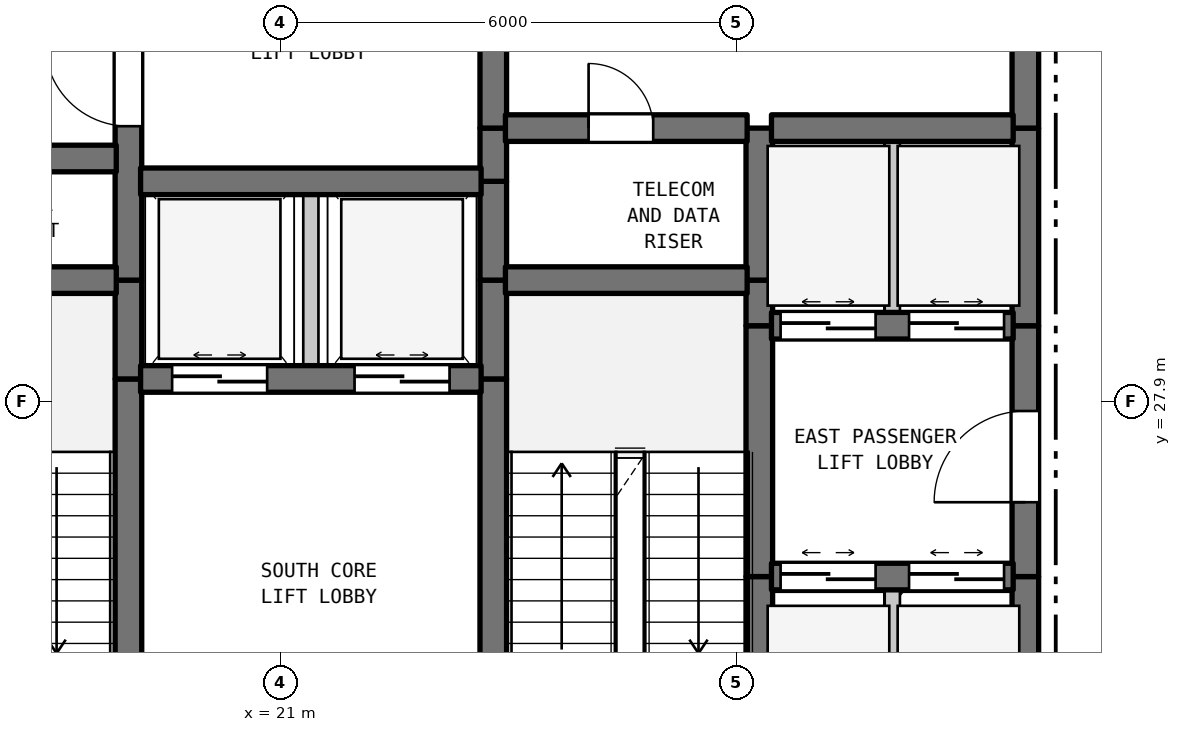
"""IFC4 building model, lengths in metres.
Left out: names, types, materials, properties, quantities, classifications, styles, units other than length and angle.
Written with IfcOpenShell. Run it as: python <this file> out.ifc"""

import sys

from ifc_helpers import new_model, si_unit, direction, frame, frame_2d, origin, place, context, subcontext, project, spatial, rectangle, extrude, element, fill, save


model = new_model("IFC4")
c1 = context("Model", 3, precision=1e-05, world=origin(), true_north=direction((0.0, 1.0)))
c2 = subcontext(c1, "Body", "Model", "MODEL_VIEW")
j1 = project(units=[si_unit("LENGTHUNIT", "METRE"), si_unit("PLANEANGLEUNIT", "RADIAN")], contexts=[c1])
p1 = place(None, origin())
s1 = spatial("IfcSite", under=j1, at=p1, CompositionType="ELEMENT")
p2 = place(p1, origin())
s2 = spatial("IfcBuilding", under=s1, at=p2, CompositionType="ELEMENT")
p3 = place(p2, frame((0.0, 0.0, 214.3)))
s3 = spatial("IfcBuildingStorey", under=s2, at=p3, CompositionType="ELEMENT", Elevation=214.3)
p4 = place(p3, frame((19.0, 22.7, 0.0), z_axis=(0.0, 0.0, 1.0), x_axis=(0.0, 1.0, 0.0)))
e1 = element("IfcWall", 1, at=p4, inside=s3, PredefinedType="SHEAR", context=c2, shape_type="SweptSolid", body=[
    extrude(rectangle(XDim=5.5, YDim=0.35, at=frame_2d((2.75, 0.0))), origin(), (0.0, 0.0, 1.0), 3.38),
])
p5 = place(p4, frame((0.631, 0.0, 0.0)))
e2 = element("IfcOpeningElement", 2, at=p5, cuts=e1, PredefinedType="OPENING", context=c2, shape_type="SweptSolid", body=[
    extrude(rectangle(XDim=1.1, YDim=2.15, at=frame_2d((0.55, 1.075))), frame((0.0, 0.185, 0.0), z_axis=(0.0, -1.0, 0.0), x_axis=(1.0, 0.0, 0.0)), (0.0, 0.0, 1.0), 0.37),
])
p6 = place(p3, frame((19.0, 28.2, 0.0), z_axis=(0.0, 0.0, 1.0), x_axis=(0.0, 1.0, 0.0)))
e3 = element("IfcWall", 3, at=p6, inside=s3, PredefinedType="SHEAR", context=c2, shape_type="SweptSolid", body=[
    extrude(rectangle(XDim=1.3, YDim=0.35, at=frame_2d((0.65, 0.0))), origin(), (0.0, 0.0, 1.0), 3.38),
])
p7 = place(p3, frame((19.0, 29.5, 0.0), z_axis=(0.0, 0.0, 1.0), x_axis=(0.0, 1.0, 0.0)))
e4 = element("IfcWall", 4, at=p7, inside=s3, PredefinedType="SHEAR", context=c2, shape_type="SweptSolid", body=[
    extrude(rectangle(XDim=5.5, YDim=0.35, at=frame_2d((2.75, 0.0))), origin(), (0.0, 0.0, 1.0), 3.38),
])
p8 = place(p7, frame((2.025, 0.0, 0.0)))
e5 = element("IfcOpeningElement", 5, at=p8, cuts=e4, PredefinedType="OPENING", context=c2, shape_type="SweptSolid", body=[
    extrude(rectangle(XDim=1.1, YDim=2.15, at=frame_2d((0.55, 1.075))), frame((0.0, 0.185, 0.0), z_axis=(0.0, -1.0, 0.0), x_axis=(1.0, 0.0, 0.0)), (0.0, 0.0, 1.0), 0.37),
])
p9 = place(p3, frame((21.4, 28.2, 0.0), z_axis=(0.0, 0.0, 1.0), x_axis=(0.0, 1.0, 0.0)))
e6 = element("IfcWall", 6, at=p9, inside=s3, PredefinedType="STANDARD", context=c2, shape_type="SweptSolid", body=[
    extrude(rectangle(XDim=2.6, YDim=0.2, at=frame_2d((1.3, 0.0))), origin(), (0.0, 0.0, 1.0), 3.38),
])
p10 = place(p3, frame((23.8, 22.7, 0.0), z_axis=(0.0, 0.0, 1.0), x_axis=(0.0, 1.0, 0.0)))
e7 = element("IfcWall", 7, at=p10, inside=s3, PredefinedType="SHEAR", context=c2, shape_type="SweptSolid", body=[
    extrude(rectangle(XDim=5.5, YDim=0.35, at=frame_2d((2.75, 0.0))), origin(), (0.0, 0.0, 1.0), 3.38),
])
p11 = place(p10, frame((0.235, 0.0, 0.0)))
e8 = element("IfcOpeningElement", 8, at=p11, cuts=e7, PredefinedType="OPENING", context=c2, shape_type="SweptSolid", body=[
    extrude(rectangle(XDim=1.1, YDim=2.15, at=frame_2d((0.55, 1.075))), frame((0.0, 0.185, 0.0), z_axis=(0.0, -1.0, 0.0), x_axis=(1.0, 0.0, 0.0)), (0.0, 0.0, 1.0), 0.37),
])
for number, where, z_axis, x_axis in (
    (9, (23.8, 28.2, 0.0), (0.0, 0.0, 1.0), (0.0, 1.0, 0.0)),
    (10, (23.8, 29.5, 0.0), (0.0, 0.0, 1.0), (0.0, 1.0, 0.0)),
):
    element("IfcWall", number, at=place(p3, frame(where, z_axis=z_axis, x_axis=x_axis)), inside=s3, PredefinedType="SHEAR", context=c2, shape_type="SweptSolid", body=[
        extrude(rectangle(XDim=1.3, YDim=0.35, at=frame_2d((0.65, 0.0))), origin(), (0.0, 0.0, 1.0), 3.38),
    ])
p12 = place(p3, frame((23.8, 30.8, 0.0), z_axis=(0.0, 0.0, 1.0), x_axis=(0.0, 1.0, 0.0)))
e11 = element("IfcWall", 11, at=p12, inside=s3, PredefinedType="SHEAR", context=c2, shape_type="SweptSolid", body=[
    extrude(rectangle(XDim=0.7, YDim=0.35, at=frame_2d((0.35, 0.0))), origin(), (0.0, 0.0, 1.0), 3.38),
])
p13 = place(p3, frame((23.8, 31.5, 0.0), z_axis=(0.0, 0.0, 1.0), x_axis=(0.0, 1.0, 0.0)))
e12 = element("IfcWall", 12, at=p13, inside=s3, PredefinedType="SHEAR", context=c2, shape_type="SweptSolid", body=[
    extrude(rectangle(XDim=3.5, YDim=0.35, at=frame_2d((1.75, 0.0))), origin(), (0.0, 0.0, 1.0), 3.38),
])
p14 = place(p13, frame((1.127, 0.0, 0.0)))
e13 = element("IfcOpeningElement", 13, at=p14, cuts=e12, PredefinedType="OPENING", context=c2, shape_type="SweptSolid", body=[
    extrude(rectangle(XDim=1.1, YDim=2.15, at=frame_2d((0.55, 1.075))), frame((0.0, 0.185, 0.0), z_axis=(0.0, -1.0, 0.0), x_axis=(1.0, 0.0, 0.0)), (0.0, 0.0, 1.0), 0.37),
])
p15 = place(p3, frame((27.3, 22.7, 0.0), z_axis=(0.0, 0.0, 1.0), x_axis=(0.0, 1.0, 0.0)))
e14 = element("IfcWall", 14, at=p15, inside=s3, PredefinedType="SHEAR", context=c2, shape_type="SweptSolid", body=[
    extrude(rectangle(XDim=2.9, YDim=0.35, at=frame_2d((1.45, 0.0))), origin(), (0.0, 0.0, 1.0), 3.38),
])
p16 = place(p3, frame((27.3, 25.6, 0.0), z_axis=(0.0, 0.0, 1.0), x_axis=(0.0, 1.0, 0.0)))
e15 = element("IfcWall", 15, at=p16, inside=s3, PredefinedType="SHEAR", context=c2, shape_type="SweptSolid", body=[
    extrude(rectangle(XDim=3.3, YDim=0.35, at=frame_2d((1.65, 0.0))), origin(), (0.0, 0.0, 1.0), 3.38),
])
p17 = place(p3, frame((27.3, 28.9, 0.0), z_axis=(0.0, 0.0, 1.0), x_axis=(0.0, 1.0, 0.0)))
e16 = element("IfcWall", 16, at=p17, inside=s3, PredefinedType="SHEAR", context=c2, shape_type="SweptSolid", body=[
    extrude(rectangle(XDim=0.6, YDim=0.35, at=frame_2d((0.3, 0.0))), origin(), (0.0, 0.0, 1.0), 3.38),
])
p18 = place(p3, frame((27.3, 29.5, 0.0), z_axis=(0.0, 0.0, 1.0), x_axis=(0.0, 1.0, 0.0)))
e17 = element("IfcWall", 17, at=p18, inside=s3, PredefinedType="SHEAR", context=c2, shape_type="SweptSolid", body=[
    extrude(rectangle(XDim=2.0, YDim=0.35, at=frame_2d((1.0, 0.0))), origin(), (0.0, 0.0, 1.0), 3.38),
])
p19 = place(p3, frame((29.05, 22.7, 0.0), z_axis=(0.0, 0.0, 1.0), x_axis=(0.0, 1.0, 0.0)))
e18 = element("IfcWall", 18, at=p19, inside=s3, PredefinedType="STANDARD", context=c2, shape_type="SweptSolid", body=[
    extrude(rectangle(XDim=2.9, YDim=0.2, at=frame_2d((1.45, 0.0))), origin(), (0.0, 0.0, 1.0), 3.38),
])
p20 = place(p3, frame((29.05, 28.9, 0.0), z_axis=(0.0, 0.0, 1.0), x_axis=(0.0, 1.0, 0.0)))
e19 = element("IfcWall", 19, at=p20, inside=s3, PredefinedType="STANDARD", context=c2, shape_type="SweptSolid", body=[
    extrude(rectangle(XDim=2.6, YDim=0.2, at=frame_2d((1.3, 0.0))), origin(), (0.0, 0.0, 1.0), 3.38),
])
p21 = place(p3, frame((30.8, 22.7, 0.0), z_axis=(0.0, 0.0, 1.0), x_axis=(0.0, 1.0, 0.0)))
e20 = element("IfcWall", 20, at=p21, inside=s3, PredefinedType="SHEAR", context=c2, shape_type="SweptSolid", body=[
    extrude(rectangle(XDim=2.9, YDim=0.35, at=frame_2d((1.45, 0.0))), origin(), (0.0, 0.0, 1.0), 3.38),
])
p22 = place(p3, frame((30.8, 25.6, 0.0), z_axis=(0.0, 0.0, 1.0), x_axis=(0.0, 1.0, 0.0)))
e21 = element("IfcWall", 21, at=p22, inside=s3, PredefinedType="SHEAR", context=c2, shape_type="SweptSolid", body=[
    extrude(rectangle(XDim=3.3, YDim=0.35, at=frame_2d((1.65, 0.0))), origin(), (0.0, 0.0, 1.0), 3.38),
])
p23 = place(p22, frame((0.978, 0.0, 0.0)))
e22 = element("IfcOpeningElement", 22, at=p23, cuts=e21, PredefinedType="OPENING", context=c2, shape_type="SweptSolid", body=[
    extrude(rectangle(XDim=1.2, YDim=2.2, at=frame_2d((0.6, 1.1))), frame((0.0, 0.185, 0.0), z_axis=(0.0, -1.0, 0.0), x_axis=(1.0, 0.0, 0.0)), (0.0, 0.0, 1.0), 0.37),
])
p24 = place(p3, frame((30.8, 28.9, 0.0), z_axis=(0.0, 0.0, 1.0), x_axis=(0.0, 1.0, 0.0)))
e23 = element("IfcWall", 23, at=p24, inside=s3, PredefinedType="SHEAR", context=c2, shape_type="SweptSolid", body=[
    extrude(rectangle(XDim=2.6, YDim=0.35, at=frame_2d((1.3, 0.0))), origin(), (0.0, 0.0, 1.0), 3.38),
])
p25 = place(p3, frame((30.8, 31.5, 0.0), z_axis=(0.0, 0.0, 1.0), x_axis=(0.0, 1.0, 0.0)))
e24 = element("IfcWall", 24, at=p25, inside=s3, PredefinedType="SHEAR", context=c2, shape_type="SweptSolid", body=[
    extrude(rectangle(XDim=3.5, YDim=0.35, at=frame_2d((1.75, 0.0))), origin(), (0.0, 0.0, 1.0), 3.38),
])
p26 = place(p25, frame((1.15, 0.0, 0.0)))
e25 = element("IfcOpeningElement", 25, at=p26, cuts=e24, PredefinedType="OPENING", context=c2, shape_type="SweptSolid", body=[
    extrude(rectangle(XDim=1.2, YDim=2.2, at=frame_2d((0.6, 1.1))), frame((0.0, 0.185, 0.0), z_axis=(0.0, -1.0, 0.0), x_axis=(1.0, 0.0, 0.0)), (0.0, 0.0, 1.0), 0.37),
])
p27 = place(p3, frame((27.46, 25.6, 0.0), z_axis=(0.0, 0.0, 1.0), x_axis=(1.0, 0.0, 0.0)))
e26 = element("IfcWall", 26, at=p27, inside=s3, PredefinedType="SHEAR", context=c2, shape_type="SweptSolid", body=[
    extrude(rectangle(XDim=3.18, YDim=0.35, at=frame_2d((1.59, 0.0))), origin(), (0.0, 0.0, 1.0), 3.38),
])
p28 = place(p27, frame((0.12, 0.0, 0.0)))
e27 = element("IfcOpeningElement", 27, at=p28, cuts=e26, PredefinedType="OPENING", context=c2, shape_type="SweptSolid", body=[
    extrude(rectangle(XDim=1.25, YDim=2.2, at=frame_2d((0.625, 1.1))), frame((0.0, 0.185, 0.0), z_axis=(0.0, -1.0, 0.0), x_axis=(1.0, 0.0, 0.0)), (0.0, 0.0, 1.0), 0.37),
])
p29 = place(p27, frame((1.81, 0.0, 0.0)))
e28 = element("IfcOpeningElement", 28, at=p29, cuts=e26, PredefinedType="OPENING", context=c2, shape_type="SweptSolid", body=[
    extrude(rectangle(XDim=1.25, YDim=2.2, at=frame_2d((0.625, 1.1))), frame((0.0, 0.185, 0.0), z_axis=(0.0, -1.0, 0.0), x_axis=(1.0, 0.0, 0.0)), (0.0, 0.0, 1.0), 0.37),
])
p30 = place(p3, frame((19.16, 28.2, 0.0), z_axis=(0.0, 0.0, 1.0), x_axis=(1.0, 0.0, 0.0)))
e29 = element("IfcWall", 29, at=p30, inside=s3, PredefinedType="SHEAR", context=c2, shape_type="SweptSolid", body=[
    extrude(rectangle(XDim=4.48, YDim=0.35, at=frame_2d((2.24, 0.0))), origin(), (0.0, 0.0, 1.0), 3.38),
])
p31 = place(p30, frame((0.415, 0.0, 0.0)))
e30 = element("IfcOpeningElement", 30, at=p31, cuts=e29, PredefinedType="OPENING", context=c2, shape_type="SweptSolid", body=[
    extrude(rectangle(XDim=1.25, YDim=2.2, at=frame_2d((0.625, 1.1))), frame((0.0, 0.185, 0.0), z_axis=(0.0, -1.0, 0.0), x_axis=(1.0, 0.0, 0.0)), (0.0, 0.0, 1.0), 0.37),
])
p32 = place(p30, frame((2.815, 0.0, 0.0)))
e31 = element("IfcOpeningElement", 31, at=p32, cuts=e29, PredefinedType="OPENING", context=c2, shape_type="SweptSolid", body=[
    extrude(rectangle(XDim=1.25, YDim=2.2, at=frame_2d((0.625, 1.1))), frame((0.0, 0.185, 0.0), z_axis=(0.0, -1.0, 0.0), x_axis=(1.0, 0.0, 0.0)), (0.0, 0.0, 1.0), 0.37),
])
p33 = place(p3, frame((27.46, 28.9, 0.0), z_axis=(0.0, 0.0, 1.0), x_axis=(1.0, 0.0, 0.0)))
e32 = element("IfcWall", 32, at=p33, inside=s3, PredefinedType="SHEAR", context=c2, shape_type="SweptSolid", body=[
    extrude(rectangle(XDim=3.18, YDim=0.35, at=frame_2d((1.59, 0.0))), origin(), (0.0, 0.0, 1.0), 3.38),
])
p34 = place(p33, frame((0.12, 0.0, 0.0)))
e33 = element("IfcOpeningElement", 33, at=p34, cuts=e32, PredefinedType="OPENING", context=c2, shape_type="SweptSolid", body=[
    extrude(rectangle(XDim=1.25, YDim=2.2, at=frame_2d((0.625, 1.1))), frame((0.0, 0.185, 0.0), z_axis=(0.0, -1.0, 0.0), x_axis=(1.0, 0.0, 0.0)), (0.0, 0.0, 1.0), 0.37),
])
p35 = place(p33, frame((1.81, 0.0, 0.0)))
e34 = element("IfcOpeningElement", 34, at=p35, cuts=e32, PredefinedType="OPENING", context=c2, shape_type="SweptSolid", body=[
    extrude(rectangle(XDim=1.25, YDim=2.2, at=frame_2d((0.625, 1.1))), frame((0.0, 0.185, 0.0), z_axis=(0.0, -1.0, 0.0), x_axis=(1.0, 0.0, 0.0)), (0.0, 0.0, 1.0), 0.37),
])
p36 = place(p3, frame((15.16, 29.5, 0.0), z_axis=(0.0, 0.0, 1.0), x_axis=(1.0, 0.0, 0.0)))
e35 = element("IfcWall", 35, at=p36, inside=s3, PredefinedType="SHEAR", context=c2, shape_type="SweptSolid", body=[
    extrude(rectangle(XDim=3.68, YDim=0.35, at=frame_2d((1.84, 0.0))), origin(), (0.0, 0.0, 1.0), 3.38),
])
p37 = place(p3, frame((23.96, 29.5, 0.0), z_axis=(0.0, 0.0, 1.0), x_axis=(1.0, 0.0, 0.0)))
e36 = element("IfcWall", 36, at=p37, inside=s3, PredefinedType="SHEAR", context=c2, shape_type="SweptSolid", body=[
    extrude(rectangle(XDim=3.18, YDim=0.35, at=frame_2d((1.59, 0.0))), origin(), (0.0, 0.0, 1.0), 3.38),
])
p38 = place(p3, frame((19.16, 30.8, 0.0), z_axis=(0.0, 0.0, 1.0), x_axis=(1.0, 0.0, 0.0)))
e37 = element("IfcWall", 37, at=p38, inside=s3, PredefinedType="SHEAR", context=c2, shape_type="SweptSolid", body=[
    extrude(rectangle(XDim=4.48, YDim=0.35, at=frame_2d((2.24, 0.0))), origin(), (0.0, 0.0, 1.0), 3.38),
])
p39 = place(p3, frame((15.16, 31.1, 0.0), z_axis=(0.0, 0.0, 1.0), x_axis=(1.0, 0.0, 0.0)))
e38 = element("IfcWall", 38, at=p39, inside=s3, PredefinedType="SHEAR", context=c2, shape_type="SweptSolid", body=[
    extrude(rectangle(XDim=3.68, YDim=0.35, at=frame_2d((1.84, 0.0))), origin(), (0.0, 0.0, 1.0), 3.38),
])
p40 = place(p3, frame((23.96, 31.5, 0.0), z_axis=(0.0, 0.0, 1.0), x_axis=(1.0, 0.0, 0.0)))
e39 = element("IfcWall", 39, at=p40, inside=s3, PredefinedType="SHEAR", context=c2, shape_type="SweptSolid", body=[
    extrude(rectangle(XDim=3.18, YDim=0.35, at=frame_2d((1.59, 0.0))), origin(), (0.0, 0.0, 1.0), 3.38),
])
p41 = place(p40, frame((1.094, 0.0, 0.0)))
e40 = element("IfcOpeningElement", 40, at=p41, cuts=e39, PredefinedType="OPENING", context=c2, shape_type="SweptSolid", body=[
    extrude(rectangle(XDim=0.85, YDim=2.1, at=frame_2d((0.425, 1.05))), frame((0.0, 0.185, 0.0), z_axis=(0.0, -1.0, 0.0), x_axis=(1.0, 0.0, 0.0)), (0.0, 0.0, 1.0), 0.37),
])
p42 = place(p3, frame((27.46, 31.5, 0.0), z_axis=(0.0, 0.0, 1.0), x_axis=(1.0, 0.0, 0.0)))
e41 = element("IfcWall", 41, at=p42, inside=s3, PredefinedType="SHEAR", context=c2, shape_type="SweptSolid", body=[
    extrude(rectangle(XDim=3.18, YDim=0.35, at=frame_2d((1.59, 0.0))), origin(), (0.0, 0.0, 1.0), 3.38),
])
p43 = place(p8, origin())
e42 = element("IfcDoor", 42, at=p43, inside=s3, OperationType="SINGLE_SWING_RIGHT", PredefinedType="DOOR", context=c2, shape_type="SweptSolid", body=[
    extrude(rectangle(XDim=1.1, YDim=2.15, at=frame_2d((0.55, 1.075))), frame((0.0, 0.025, 0.0), z_axis=(0.0, -1.0, 0.0), x_axis=(1.0, 0.0, 0.0)), (0.0, 0.0, 1.0), 0.05),
])
fill(e5, e42)
p44 = place(p23, origin())
e43 = element("IfcDoor", 43, at=p44, inside=s3, OperationType="SINGLE_SWING_LEFT", PredefinedType="DOOR", context=c2, shape_type="SweptSolid", body=[
    extrude(rectangle(XDim=1.2, YDim=2.2, at=frame_2d((0.6, 1.1))), frame((0.0, 0.025, 0.0), z_axis=(0.0, -1.0, 0.0), x_axis=(1.0, 0.0, 0.0)), (0.0, 0.0, 1.0), 0.05),
])
fill(e22, e43)
p45 = place(p28, origin())
e44 = element("IfcDoor", 44, at=p45, inside=s3, OperationType="DOUBLE_DOOR_SLIDING", PredefinedType="DOOR", context=c2, shape_type="SweptSolid", body=[
    extrude(rectangle(XDim=1.25, YDim=2.2, at=frame_2d((0.625, 1.1))), frame((0.0, 0.025, 0.0), z_axis=(0.0, -1.0, 0.0), x_axis=(1.0, 0.0, 0.0)), (0.0, 0.0, 1.0), 0.05),
])
fill(e27, e44)
p46 = place(p29, origin())
e45 = element("IfcDoor", 45, at=p46, inside=s3, OperationType="DOUBLE_DOOR_SLIDING", PredefinedType="DOOR", context=c2, shape_type="SweptSolid", body=[
    extrude(rectangle(XDim=1.25, YDim=2.2, at=frame_2d((0.625, 1.1))), frame((0.0, 0.025, 0.0), z_axis=(0.0, -1.0, 0.0), x_axis=(1.0, 0.0, 0.0)), (0.0, 0.0, 1.0), 0.05),
])
fill(e28, e45)
p47 = place(p31, origin())
e46 = element("IfcDoor", 46, at=p47, inside=s3, OperationType="DOUBLE_DOOR_SLIDING", PredefinedType="DOOR", context=c2, shape_type="SweptSolid", body=[
    extrude(rectangle(XDim=1.25, YDim=2.2, at=frame_2d((0.625, 1.1))), frame((0.0, 0.025, 0.0), z_axis=(0.0, -1.0, 0.0), x_axis=(1.0, 0.0, 0.0)), (0.0, 0.0, 1.0), 0.05),
])
fill(e30, e46)
p48 = place(p32, origin())
e47 = element("IfcDoor", 47, at=p48, inside=s3, OperationType="DOUBLE_DOOR_SLIDING", PredefinedType="DOOR", context=c2, shape_type="SweptSolid", body=[
    extrude(rectangle(XDim=1.25, YDim=2.2, at=frame_2d((0.625, 1.1))), frame((0.0, 0.025, 0.0), z_axis=(0.0, -1.0, 0.0), x_axis=(1.0, 0.0, 0.0)), (0.0, 0.0, 1.0), 0.05),
])
fill(e31, e47)
p49 = place(p34, origin())
e48 = element("IfcDoor", 48, at=p49, inside=s3, OperationType="DOUBLE_DOOR_SLIDING", PredefinedType="DOOR", context=c2, shape_type="SweptSolid", body=[
    extrude(rectangle(XDim=1.25, YDim=2.2, at=frame_2d((0.625, 1.1))), frame((0.0, 0.025, 0.0), z_axis=(0.0, -1.0, 0.0), x_axis=(1.0, 0.0, 0.0)), (0.0, 0.0, 1.0), 0.05),
])
fill(e33, e48)
p50 = place(p35, origin())
e49 = element("IfcDoor", 49, at=p50, inside=s3, OperationType="DOUBLE_DOOR_SLIDING", PredefinedType="DOOR", context=c2, shape_type="SweptSolid", body=[
    extrude(rectangle(XDim=1.25, YDim=2.2, at=frame_2d((0.625, 1.1))), frame((0.0, 0.025, 0.0), z_axis=(0.0, -1.0, 0.0), x_axis=(1.0, 0.0, 0.0)), (0.0, 0.0, 1.0), 0.05),
])
fill(e34, e49)
p51 = place(p41, origin())
e50 = element("IfcDoor", 50, at=p51, inside=s3, OperationType="SINGLE_SWING_LEFT", PredefinedType="DOOR", context=c2, shape_type="SweptSolid", body=[
    extrude(rectangle(XDim=0.85, YDim=2.1, at=frame_2d((0.425, 1.05))), frame((0.0, 0.025, 0.0), z_axis=(0.0, -1.0, 0.0), x_axis=(1.0, 0.0, 0.0)), (0.0, 0.0, 1.0), 0.05),
])
fill(e40, e50)
save(model, sys.argv[1])
